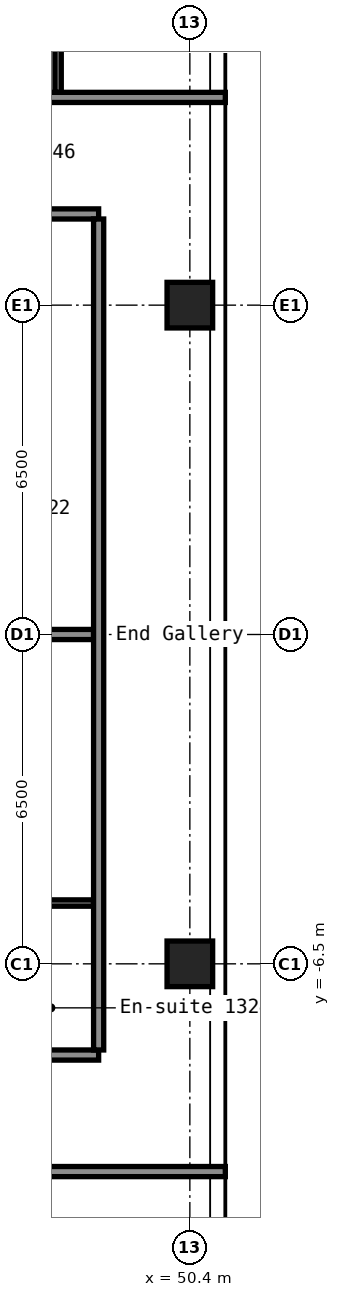
"""IFC4 building model, lengths in metres.
Left out: names, types, materials, properties, quantities, classifications, styles, units other than length and angle.
Written with IfcOpenShell. Run it as: python <this file> out.ifc"""

import sys

from ifc_helpers import new_model, si_unit, direction, frame, frame_2d, origin, origin_2d, place, context, subcontext, project, spatial, rectangle, hollow_rectangle, extrude, element, save


model = new_model("IFC4")
c1 = context("Model", 3, precision=1e-05, world=origin(), true_north=direction((0.0, 1.0)))
c2 = subcontext(c1, "Body", "Model", "MODEL_VIEW")
j1 = project(units=[si_unit("LENGTHUNIT", "METRE"), si_unit("PLANEANGLEUNIT", "RADIAN")], contexts=[c1])
p1 = place(None, origin())
s1 = spatial("IfcSite", under=j1, at=p1, CompositionType="ELEMENT")
p2 = place(p1, origin())
s2 = spatial("IfcBuilding", under=s1, at=p2, CompositionType="ELEMENT")
p3 = place(p2, frame((0.0, 0.0, 48.6)))
s3 = spatial("IfcBuildingStorey", under=s2, at=p3, CompositionType="ELEMENT", Elevation=48.6)
for number, where, z_axis, x_axis in (
    (1, (50.4, -6.5, 0.0), (0.0, 0.0, 1.0), (1.0, 0.0, 0.0)),
    (2, (50.4, 6.5, 0.0), (0.0, 0.0, 1.0), (1.0, 0.0, 0.0)),
):
    element("IfcColumn", number, at=place(p3, frame(where, z_axis=z_axis, x_axis=x_axis)), inside=s3, PredefinedType="COLUMN", context=c2, shape_type="SweptSolid", body=[
        extrude(hollow_rectangle(XDim=0.9, YDim=0.9, WallThickness=0.036, at=origin_2d()), origin(), (0.0, 0.0, 1.0), 2.8),
    ])
p4 = place(p3, frame((16.8, -10.6, 0.0), z_axis=(0.0, 0.0, 1.0), x_axis=(1.0, 0.0, 0.0)))
e3 = element("IfcWall", 3, at=p4, inside=s3, PredefinedType="PARTITIONING", context=c2, shape_type="SweptSolid", body=[
    extrude(rectangle(XDim=34.3, YDim=0.2, at=frame_2d((17.15, 0.0))), origin(), (0.0, 0.0, 1.0), 2.8),
])
p5 = place(p4, frame((3.4, 0.0, 0.0)))
e4 = element("IfcOpeningElement", 4, at=p5, cuts=e3, PredefinedType="OPENING", context=c2, shape_type="SweptSolid", body=[
    extrude(rectangle(XDim=1.6, YDim=2.1, at=frame_2d((0.8, 1.05))), frame((0.0, 0.11, 0.0), z_axis=(0.0, -1.0, 0.0), x_axis=(1.0, 0.0, 0.0)), (0.0, 0.0, 1.0), 0.22),
])
p6 = place(p4, frame((11.8, 0.0, 0.0)))
e5 = element("IfcOpeningElement", 5, at=p6, cuts=e3, PredefinedType="OPENING", context=c2, shape_type="SweptSolid", body=[
    extrude(rectangle(XDim=1.6, YDim=2.1, at=frame_2d((0.8, 1.05))), frame((0.0, 0.11, 0.0), z_axis=(0.0, -1.0, 0.0), x_axis=(1.0, 0.0, 0.0)), (0.0, 0.0, 1.0), 0.22),
])
p7 = place(p4, frame((20.2, 0.0, 0.0)))
e6 = element("IfcOpeningElement", 6, at=p7, cuts=e3, PredefinedType="OPENING", context=c2, shape_type="SweptSolid", body=[
    extrude(rectangle(XDim=1.6, YDim=2.1, at=frame_2d((0.8, 1.05))), frame((0.0, 0.11, 0.0), z_axis=(0.0, -1.0, 0.0), x_axis=(1.0, 0.0, 0.0)), (0.0, 0.0, 1.0), 0.22),
])
p8 = place(p4, frame((28.8, 0.0, 0.0)))
e7 = element("IfcOpeningElement", 7, at=p8, cuts=e3, PredefinedType="OPENING", context=c2, shape_type="SweptSolid", body=[
    extrude(rectangle(XDim=1.6, YDim=2.1, at=frame_2d((0.8, 1.05))), frame((0.0, 0.11, 0.0), z_axis=(0.0, -1.0, 0.0), x_axis=(1.0, 0.0, 0.0)), (0.0, 0.0, 1.0), 0.22),
])
p9 = place(p3, frame((33.6, -8.3, 0.0), z_axis=(0.0, 0.0, 1.0), x_axis=(1.0, 0.0, 0.0)))
e8 = element("IfcWall", 8, at=p9, inside=s3, PredefinedType="PARTITIONING", context=c2, shape_type="SweptSolid", body=[
    extrude(rectangle(XDim=15.0, YDim=0.2, at=frame_2d((7.5, 0.0))), origin(), (0.0, 0.0, 1.0), 2.8),
])
p10 = place(p9, frame((5.4, 0.0, 0.0)))
e9 = element("IfcOpeningElement", 9, at=p10, cuts=e8, PredefinedType="OPENING", context=c2, shape_type="SweptSolid", body=[
    extrude(rectangle(XDim=1.0, YDim=2.1, at=frame_2d((0.5, 1.05))), frame((0.0, 0.11, 0.0), z_axis=(0.0, -1.0, 0.0), x_axis=(1.0, 0.0, 0.0)), (0.0, 0.0, 1.0), 0.22),
])
p11 = place(p9, frame((9.95, 0.0, 0.0)))
e10 = element("IfcOpeningElement", 10, at=p11, cuts=e8, PredefinedType="OPENING", context=c2, shape_type="SweptSolid", body=[
    extrude(rectangle(XDim=1.0, YDim=2.1, at=frame_2d((0.5, 1.05))), frame((0.0, 0.11, 0.0), z_axis=(0.0, -1.0, 0.0), x_axis=(1.0, 0.0, 0.0)), (0.0, 0.0, 1.0), 0.22),
])
p12 = place(p3, frame((46.163, -5.3, 0.0), z_axis=(0.0, 0.0, 1.0), x_axis=(1.0, 0.0, 0.0)))
e11 = element("IfcWall", 11, at=p12, inside=s3, PredefinedType="PARTITIONING", context=c2, shape_type="SweptSolid", body=[
    extrude(rectangle(XDim=2.337, YDim=0.125, at=frame_2d((1.169, 0.0))), origin(), (0.0, 0.0, 1.0), 2.8),
])
p13 = place(p3, frame((33.6, 0.0, 0.0), z_axis=(0.0, 0.0, 1.0), x_axis=(1.0, 0.0, 0.0)))
e12 = element("IfcWall", 12, at=p13, inside=s3, PredefinedType="PARTITIONING", context=c2, shape_type="SweptSolid", body=[
    extrude(rectangle(XDim=14.9, YDim=0.2, at=frame_2d((7.45, 0.0))), origin(), (0.0, 0.0, 1.0), 2.8),
])
p14 = place(p3, frame((33.6, 8.3, 0.0), z_axis=(0.0, 0.0, 1.0), x_axis=(1.0, 0.0, 0.0)))
e13 = element("IfcWall", 13, at=p14, inside=s3, PredefinedType="PARTITIONING", context=c2, shape_type="SweptSolid", body=[
    extrude(rectangle(XDim=15.0, YDim=0.2, at=frame_2d((7.5, 0.0))), origin(), (0.0, 0.0, 1.0), 2.8),
])
p15 = place(p14, frame((5.4, 0.0, 0.0)))
e14 = element("IfcOpeningElement", 14, at=p15, cuts=e13, PredefinedType="OPENING", context=c2, shape_type="SweptSolid", body=[
    extrude(rectangle(XDim=1.0, YDim=2.1, at=frame_2d((0.5, 1.05))), frame((0.0, 0.11, 0.0), z_axis=(0.0, -1.0, 0.0), x_axis=(1.0, 0.0, 0.0)), (0.0, 0.0, 1.0), 0.22),
])
p16 = place(p14, frame((12.9, 0.0, 0.0)))
e15 = element("IfcOpeningElement", 15, at=p16, cuts=e13, PredefinedType="OPENING", context=c2, shape_type="SweptSolid", body=[
    extrude(rectangle(XDim=1.0, YDim=2.1, at=frame_2d((0.5, 1.05))), frame((0.0, 0.11, 0.0), z_axis=(0.0, -1.0, 0.0), x_axis=(1.0, 0.0, 0.0)), (0.0, 0.0, 1.0), 0.22),
])
p17 = place(p3, frame((16.8, 10.6, 0.0), z_axis=(0.0, 0.0, 1.0), x_axis=(1.0, 0.0, 0.0)))
e16 = element("IfcWall", 16, at=p17, inside=s3, PredefinedType="PARTITIONING", context=c2, shape_type="SweptSolid", body=[
    extrude(rectangle(XDim=34.3, YDim=0.2, at=frame_2d((17.15, 0.0))), origin(), (0.0, 0.0, 1.0), 2.8),
])
p18 = place(p17, frame((1.6, 0.0, 0.0)))
e17 = element("IfcOpeningElement", 17, at=p18, cuts=e16, PredefinedType="OPENING", context=c2, shape_type="SweptSolid", body=[
    extrude(rectangle(XDim=1.0, YDim=2.1, at=frame_2d((0.5, 1.05))), frame((0.0, 0.11, 0.0), z_axis=(0.0, -1.0, 0.0), x_axis=(1.0, 0.0, 0.0)), (0.0, 0.0, 1.0), 0.22),
])
p19 = place(p17, frame((14.2, 0.0, 0.0)))
e18 = element("IfcOpeningElement", 18, at=p19, cuts=e16, PredefinedType="OPENING", context=c2, shape_type="SweptSolid", body=[
    extrude(rectangle(XDim=1.0, YDim=2.1, at=frame_2d((0.5, 1.05))), frame((0.0, 0.11, 0.0), z_axis=(0.0, -1.0, 0.0), x_axis=(1.0, 0.0, 0.0)), (0.0, 0.0, 1.0), 0.22),
])
p20 = place(p17, frame((22.6, 0.0, 0.0)))
e19 = element("IfcOpeningElement", 19, at=p20, cuts=e16, PredefinedType="OPENING", context=c2, shape_type="SweptSolid", body=[
    extrude(rectangle(XDim=1.0, YDim=2.1, at=frame_2d((0.5, 1.05))), frame((0.0, 0.11, 0.0), z_axis=(0.0, -1.0, 0.0), x_axis=(1.0, 0.0, 0.0)), (0.0, 0.0, 1.0), 0.22),
])
p21 = place(p17, frame((26.9, 0.0, 0.0)))
e20 = element("IfcOpeningElement", 20, at=p21, cuts=e16, PredefinedType="OPENING", context=c2, shape_type="SweptSolid", body=[
    extrude(rectangle(XDim=1.0, YDim=2.1, at=frame_2d((0.5, 1.05))), frame((0.0, 0.11, 0.0), z_axis=(0.0, -1.0, 0.0), x_axis=(1.0, 0.0, 0.0)), (0.0, 0.0, 1.0), 0.22),
])
p22 = place(p3, frame((47.8, 10.7, 0.0), z_axis=(0.0, 0.0, 1.0), x_axis=(0.0, 1.0, 0.0)))
e21 = element("IfcWall", 21, at=p22, inside=s3, PredefinedType="PARTITIONING", context=c2, shape_type="SweptSolid", body=[
    extrude(rectangle(XDim=3.1, YDim=0.125, at=frame_2d((1.55, 0.0))), origin(), (0.0, 0.0, 1.0), 2.8),
])
p23 = place(p3, frame((48.6, -8.2, 0.0), z_axis=(0.0, 0.0, 1.0), x_axis=(0.0, 1.0, 0.0)))
e22 = element("IfcWall", 22, at=p23, inside=s3, PredefinedType="PARTITIONING", context=c2, shape_type="SweptSolid", body=[
    extrude(rectangle(XDim=16.4, YDim=0.2, at=frame_2d((8.2, 0.0))), origin(), (0.0, 0.0, 1.0), 2.8),
])
save(model, sys.argv[1])
